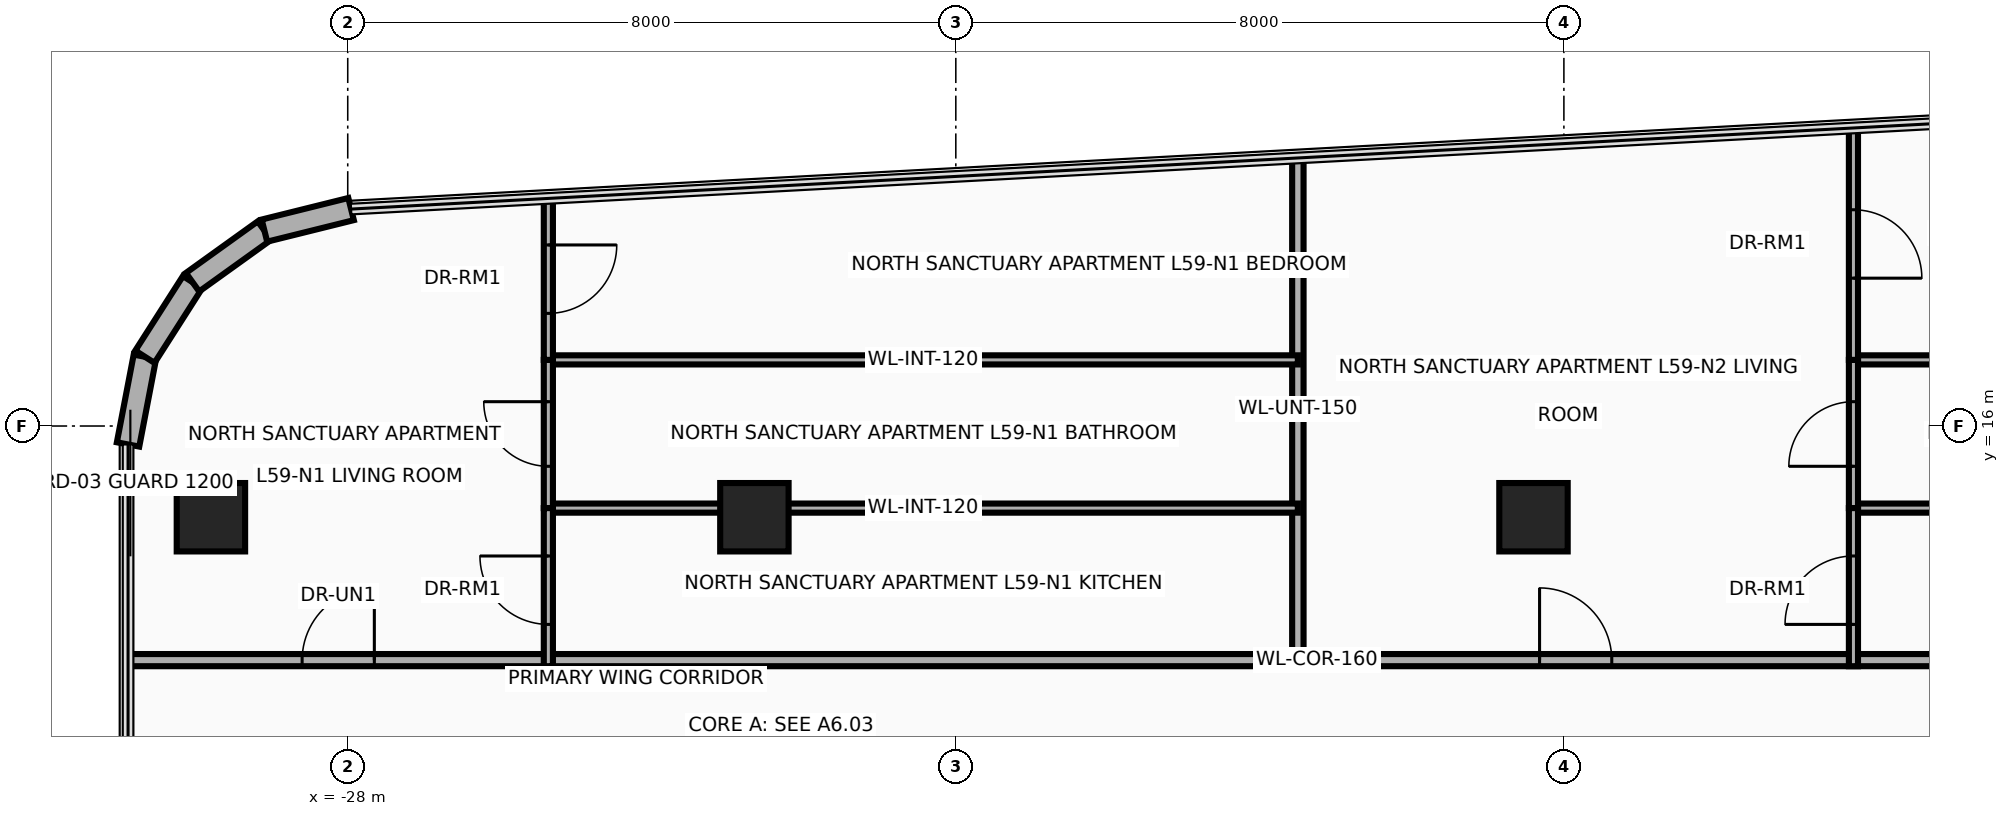
"""IFC4 building model, lengths in metres.
Left out: names, types, materials, properties, quantities, classifications, styles, units other than length and angle.
Written with IfcOpenShell. Run it as: python <this file> out.ifc"""

import sys

from ifc_helpers import new_model, si_unit, direction, frame, frame_2d, origin, origin_2d, place, context, subcontext, project, spatial, rectangle, extrude, source, transform, mapped, element, fill, save


model = new_model("IFC4")
c1 = context("Model", 3, precision=1e-05, world=origin(), true_north=direction((0.0, 1.0)))
c2 = subcontext(c1, "Body", "Model", "MODEL_VIEW")
j1 = project(units=[si_unit("LENGTHUNIT", "METRE"), si_unit("PLANEANGLEUNIT", "RADIAN")], contexts=[c1])
p1 = place(None, origin())
s1 = spatial("IfcSite", under=j1, at=p1, CompositionType="ELEMENT")
p2 = place(p1, origin())
s2 = spatial("IfcBuilding", under=s1, at=p2, CompositionType="ELEMENT")
p3 = place(p2, frame((0.0, 0.0, 230.0)))
s3 = spatial("IfcBuildingStorey", under=s2, at=p3, CompositionType="ELEMENT", Elevation=230.0)
m1 = source(origin(), c2, "Body", "SweptSolid", [
    extrude(rectangle(XDim=0.9, YDim=0.9, at=origin_2d()), origin(), (0.0, 0.0, 1.0), 3.5),
])
for number, where, z_axis, x_axis in (
    (1, (-29.8, 14.8, 0.0), (0.0, 0.0, 1.0), (1.0, 0.0, 0.0)),
    (2, (-22.65, 14.8, 0.0), (0.0, 0.0, 1.0), (1.0, 0.0, 0.0)),
    (3, (-12.4, 14.8, 0.0), (0.0, 0.0, 1.0), (1.0, 0.0, 0.0)),
):
    element("IfcColumn", number, at=place(p3, frame(where, z_axis=z_axis, x_axis=x_axis)), inside=s3, PredefinedType="COLUMN", context=c2, shape_type="MappedRepresentation", body=[
        mapped(m1, transform((0.0, 0.0, 0.0), x_axis=(1.0, 0.0, 0.0), y_axis=(0.0, 1.0, 0.0), z_axis=(0.0, 0.0, 1.0), scale=1.0)),
    ])
p4 = place(p3, frame((-30.89, 15.758, 0.0), z_axis=(0.0, 0.0, 1.0), x_axis=(0.18831542659, 0.982108598938, 0.0)))
e4 = element("IfcWall", 4, at=p4, inside=s3, PredefinedType="SOLIDWALL", context=c2, shape_type="SweptSolid", body=[
    extrude(rectangle(XDim=1.175, YDim=0.3, at=frame_2d((0.587, 0.0))), origin(), (0.0, 0.0, 1.0), 3.26),
])
p5 = place(p3, frame((-30.669, 16.911, 0.0), z_axis=(0.0, 0.0, 1.0), x_axis=(0.538678781902, 0.84251122837, 0.0)))
e5 = element("IfcWall", 5, at=p5, inside=s3, PredefinedType="SOLIDWALL", context=c2, shape_type="SweptSolid", body=[
    extrude(rectangle(XDim=1.164, YDim=0.3, at=frame_2d((0.582, 0.0))), origin(), (0.0, 0.0, 1.0), 3.26),
])
p6 = place(p3, frame((-30.042, 17.892, 0.0), z_axis=(0.0, 0.0, 1.0), x_axis=(0.812313539683, 0.583220981487, 0.0)))
e6 = element("IfcWall", 6, at=p6, inside=s3, PredefinedType="SOLIDWALL", context=c2, shape_type="SweptSolid", body=[
    extrude(rectangle(XDim=1.164, YDim=0.3, at=frame_2d((0.582, 0.0))), origin(), (0.0, 0.0, 1.0), 3.26),
])
p7 = place(p3, frame((-29.096, 18.571, 0.0), z_axis=(0.0, 0.0, 1.0), x_axis=(0.97050812798, 0.241068400098, 0.0)))
e7 = element("IfcWall", 7, at=p7, inside=s3, PredefinedType="SOLIDWALL", context=c2, shape_type="SweptSolid", body=[
    extrude(rectangle(XDim=1.175, YDim=0.3, at=frame_2d((0.587, 0.0))), origin(), (0.0, 0.0, 1.0), 3.26),
])
p8 = place(p3, frame((-30.89, 12.92, 0.0), z_axis=(0.0, 0.0, 1.0), x_axis=(1.0, 0.0, 0.0)))
e8 = element("IfcWall", 8, at=p8, inside=s3, PredefinedType="PARTITIONING", context=c2, shape_type="SweptSolid", body=[
    extrude(rectangle(XDim=31.28, YDim=0.16, at=frame_2d((15.64, 0.0))), origin(), (0.0, 0.0, 1.0), 2.634),
])
p9 = place(p8, frame((2.29, 0.0, 0.0)))
e9 = element("IfcOpeningElement", 9, at=p9, cuts=e8, PredefinedType="OPENING", context=c2, shape_type="SweptSolid", body=[
    extrude(rectangle(XDim=0.95, YDim=2.15, at=frame_2d((0.475, 1.075))), frame((0.0, 0.095, 0.0), z_axis=(0.0, -1.0, 0.0), x_axis=(1.0, 0.0, 0.0)), (0.0, 0.0, 1.0), 0.19),
])
p10 = place(p8, frame((18.57, 0.0, 0.0)))
e10 = element("IfcOpeningElement", 10, at=p10, cuts=e8, PredefinedType="OPENING", context=c2, shape_type="SweptSolid", body=[
    extrude(rectangle(XDim=0.95, YDim=2.15, at=frame_2d((0.475, 1.075))), frame((0.0, 0.095, 0.0), z_axis=(0.0, -1.0, 0.0), x_axis=(1.0, 0.0, 0.0)), (0.0, 0.0, 1.0), 0.19),
])
p11 = place(p3, frame((-15.5, 12.92, 0.0), z_axis=(0.0, 0.0, 1.0), x_axis=(0.0, 1.0, 0.0)))
e11 = element("IfcWall", 11, at=p11, inside=s3, PredefinedType="PARTITIONING", context=c2, shape_type="SweptSolid", body=[
    extrude(rectangle(XDim=6.606, YDim=0.15, at=frame_2d((3.303, 0.0))), origin(), (0.0, 0.0, 1.0), 2.544),
])
p12 = place(p3, frame((-25.361, 14.92, 0.0), z_axis=(0.0, 0.0, 1.0), x_axis=(1.0, 0.0, 0.0)))
e12 = element("IfcWall", 12, at=p12, inside=s3, PredefinedType="PARTITIONING", context=c2, shape_type="SweptSolid", body=[
    extrude(rectangle(XDim=9.861, YDim=0.12, at=frame_2d((4.93, 0.0))), origin(), (0.0, 0.0, 1.0), 2.544),
])
p13 = place(p3, frame((-25.361, 16.87, 0.0), z_axis=(0.0, 0.0, 1.0), x_axis=(1.0, 0.0, 0.0)))
e13 = element("IfcWall", 13, at=p13, inside=s3, PredefinedType="PARTITIONING", context=c2, shape_type="SweptSolid", body=[
    extrude(rectangle(XDim=9.861, YDim=0.12, at=frame_2d((4.93, 0.0))), origin(), (0.0, 0.0, 1.0), 3.26),
])
p14 = place(p3, frame((-25.361, 14.92, 0.0), z_axis=(0.0, 0.0, 1.0), x_axis=(0.0, 1.0, 0.0)))
e14 = element("IfcWall", 14, at=p14, inside=s3, PredefinedType="PARTITIONING", context=c2, shape_type="SweptSolid", body=[
    extrude(rectangle(XDim=1.95, YDim=0.12, at=frame_2d((0.975, 0.0))), origin(), (0.0, 0.0, 1.0), 2.544),
])
p15 = place(p14, frame((0.55, 0.0, 0.0)))
e15 = element("IfcOpeningElement", 15, at=p15, cuts=e14, PredefinedType="OPENING", context=c2, shape_type="SweptSolid", body=[
    extrude(rectangle(XDim=0.85, YDim=2.1, at=frame_2d((0.425, 1.05))), frame((0.0, 0.075, 0.0), z_axis=(0.0, -1.0, 0.0), x_axis=(1.0, 0.0, 0.0)), (0.0, 0.0, 1.0), 0.15),
])
p16 = place(p3, frame((-25.361, 12.84, 0.0), z_axis=(0.0, 0.0, 1.0), x_axis=(0.0, 1.0, 0.0)))
e16 = element("IfcWall", 16, at=p16, inside=s3, PredefinedType="PARTITIONING", context=c2, shape_type="SweptSolid", body=[
    extrude(rectangle(XDim=2.08, YDim=0.12, at=frame_2d((1.04, 0.0))), origin(), (0.0, 0.0, 1.0), 2.544),
])
p17 = place(p16, frame((0.55, 0.0, 0.0)))
e17 = element("IfcOpeningElement", 17, at=p17, cuts=e16, PredefinedType="OPENING", context=c2, shape_type="SweptSolid", body=[
    extrude(rectangle(XDim=0.9, YDim=2.1, at=frame_2d((0.45, 1.05))), frame((0.0, 0.075, 0.0), z_axis=(0.0, -1.0, 0.0), x_axis=(1.0, 0.0, 0.0)), (0.0, 0.0, 1.0), 0.15),
])
p18 = place(p3, frame((-25.361, 16.87, 0.0), z_axis=(0.0, 0.0, 1.0), x_axis=(0.0, 1.0, 0.0)))
e18 = element("IfcWall", 18, at=p18, inside=s3, PredefinedType="PARTITIONING", context=c2, shape_type="SweptSolid", body=[
    extrude(rectangle(XDim=2.124, YDim=0.12, at=frame_2d((1.062, 0.0))), origin(), (0.0, 0.0, 1.0), 3.26),
])
p19 = place(p18, frame((0.612, 0.0, 0.0)))
e19 = element("IfcOpeningElement", 19, at=p19, cuts=e18, PredefinedType="OPENING", context=c2, shape_type="SweptSolid", body=[
    extrude(rectangle(XDim=0.9, YDim=2.1, at=frame_2d((0.45, 1.05))), frame((0.0, 0.075, 0.0), z_axis=(0.0, -1.0, 0.0), x_axis=(1.0, 0.0, 0.0)), (0.0, 0.0, 1.0), 0.15),
])
p20 = place(p3, frame((-8.191, 14.92, 0.0), z_axis=(0.0, 0.0, 1.0), x_axis=(1.0, 0.0, 0.0)))
e20 = element("IfcWall", 20, at=p20, inside=s3, PredefinedType="PARTITIONING", context=c2, shape_type="SweptSolid", body=[
    extrude(rectangle(XDim=8.581, YDim=0.12, at=frame_2d((4.29, 0.0))), origin(), (0.0, 0.0, 1.0), 2.544),
])
p21 = place(p3, frame((-8.191, 16.87, 0.0), z_axis=(0.0, 0.0, 1.0), x_axis=(1.0, 0.0, 0.0)))
e21 = element("IfcWall", 21, at=p21, inside=s3, PredefinedType="PARTITIONING", context=c2, shape_type="SweptSolid", body=[
    extrude(rectangle(XDim=8.581, YDim=0.12, at=frame_2d((4.29, 0.0))), origin(), (0.0, 0.0, 1.0), 3.26),
])
p22 = place(p3, frame((-8.191, 14.92, 0.0), z_axis=(0.0, 0.0, 1.0), x_axis=(0.0, 1.0, 0.0)))
e22 = element("IfcWall", 22, at=p22, inside=s3, PredefinedType="PARTITIONING", context=c2, shape_type="SweptSolid", body=[
    extrude(rectangle(XDim=1.95, YDim=0.12, at=frame_2d((0.975, 0.0))), origin(), (0.0, 0.0, 1.0), 2.544),
])
p23 = place(p22, frame((0.55, 0.0, 0.0)))
e23 = element("IfcOpeningElement", 23, at=p23, cuts=e22, PredefinedType="OPENING", context=c2, shape_type="SweptSolid", body=[
    extrude(rectangle(XDim=0.85, YDim=2.1, at=frame_2d((0.425, 1.05))), frame((0.0, 0.075, 0.0), z_axis=(0.0, -1.0, 0.0), x_axis=(1.0, 0.0, 0.0)), (0.0, 0.0, 1.0), 0.15),
])
p24 = place(p3, frame((-8.191, 12.84, 0.0), z_axis=(0.0, 0.0, 1.0), x_axis=(0.0, 1.0, 0.0)))
e24 = element("IfcWall", 24, at=p24, inside=s3, PredefinedType="PARTITIONING", context=c2, shape_type="SweptSolid", body=[
    extrude(rectangle(XDim=2.08, YDim=0.12, at=frame_2d((1.04, 0.0))), origin(), (0.0, 0.0, 1.0), 2.544),
])
p25 = place(p24, frame((0.55, 0.0, 0.0)))
e25 = element("IfcOpeningElement", 25, at=p25, cuts=e24, PredefinedType="OPENING", context=c2, shape_type="SweptSolid", body=[
    extrude(rectangle(XDim=0.9, YDim=2.1, at=frame_2d((0.45, 1.05))), frame((0.0, 0.075, 0.0), z_axis=(0.0, -1.0, 0.0), x_axis=(1.0, 0.0, 0.0)), (0.0, 0.0, 1.0), 0.15),
])
p26 = place(p3, frame((-8.191, 16.87, 0.0), z_axis=(0.0, 0.0, 1.0), x_axis=(0.0, 1.0, 0.0)))
e26 = element("IfcWall", 26, at=p26, inside=s3, PredefinedType="PARTITIONING", context=c2, shape_type="SweptSolid", body=[
    extrude(rectangle(XDim=3.051, YDim=0.12, at=frame_2d((1.525, 0.0))), origin(), (0.0, 0.0, 1.0), 3.26),
])
p27 = place(p26, frame((1.075, 0.0, 0.0)))
e27 = element("IfcOpeningElement", 27, at=p27, cuts=e26, PredefinedType="OPENING", context=c2, shape_type="SweptSolid", body=[
    extrude(rectangle(XDim=0.9, YDim=2.1, at=frame_2d((0.45, 1.05))), frame((0.0, 0.075, 0.0), z_axis=(0.0, -1.0, 0.0), x_axis=(1.0, 0.0, 0.0)), (0.0, 0.0, 1.0), 0.15),
])
p28 = place(p9, origin())
e28 = element("IfcDoor", 28, at=p28, inside=s3, OperationType="SINGLE_SWING_RIGHT", PredefinedType="DOOR", context=c2, shape_type="SweptSolid", body=[
    extrude(rectangle(XDim=0.95, YDim=2.15, at=frame_2d((0.475, 1.075))), frame((0.0, 0.025, 0.0), z_axis=(0.0, -1.0, 0.0), x_axis=(1.0, 0.0, 0.0)), (0.0, 0.0, 1.0), 0.05),
])
fill(e9, e28)
p29 = place(p15, origin())
e29 = element("IfcDoor", 29, at=p29, inside=s3, OperationType="SINGLE_SWING_LEFT", PredefinedType="DOOR", context=c2, shape_type="SweptSolid", body=[
    extrude(rectangle(XDim=0.85, YDim=2.1, at=frame_2d((0.425, 1.05))), frame((0.0, 0.025, 0.0), z_axis=(0.0, -1.0, 0.0), x_axis=(1.0, 0.0, 0.0)), (0.0, 0.0, 1.0), 0.05),
])
fill(e15, e29)
p30 = place(p17, origin())
e30 = element("IfcDoor", 30, at=p30, inside=s3, OperationType="SINGLE_SWING_RIGHT", PredefinedType="DOOR", context=c2, shape_type="SweptSolid", body=[
    extrude(rectangle(XDim=0.9, YDim=2.1, at=frame_2d((0.45, 1.05))), frame((0.0, 0.025, 0.0), z_axis=(0.0, -1.0, 0.0), x_axis=(1.0, 0.0, 0.0)), (0.0, 0.0, 1.0), 0.05),
])
fill(e17, e30)
p31 = place(p19, frame((0.9, 0.0, 0.0), z_axis=(0.0, 0.0, 1.0), x_axis=(-1.0, 0.0, 0.0)))
e31 = element("IfcDoor", 31, at=p31, inside=s3, OperationType="SINGLE_SWING_LEFT", PredefinedType="DOOR", context=c2, shape_type="SweptSolid", body=[
    extrude(rectangle(XDim=0.9, YDim=2.1, at=frame_2d((0.45, 1.05))), frame((0.0, 0.025, 0.0), z_axis=(0.0, -1.0, 0.0), x_axis=(1.0, 0.0, 0.0)), (0.0, 0.0, 1.0), 0.05),
])
fill(e19, e31)
p32 = place(p10, origin())
e32 = element("IfcDoor", 32, at=p32, inside=s3, OperationType="SINGLE_SWING_RIGHT", PredefinedType="DOOR", context=c2, shape_type="SweptSolid", body=[
    extrude(rectangle(XDim=0.95, YDim=2.15, at=frame_2d((0.475, 1.075))), frame((0.0, 0.025, 0.0), z_axis=(0.0, -1.0, 0.0), x_axis=(1.0, 0.0, 0.0)), (0.0, 0.0, 1.0), 0.05),
])
fill(e10, e32)
p33 = place(p23, origin())
e33 = element("IfcDoor", 33, at=p33, inside=s3, OperationType="SINGLE_SWING_LEFT", PredefinedType="DOOR", context=c2, shape_type="SweptSolid", body=[
    extrude(rectangle(XDim=0.85, YDim=2.1, at=frame_2d((0.425, 1.05))), frame((0.0, 0.025, 0.0), z_axis=(0.0, -1.0, 0.0), x_axis=(1.0, 0.0, 0.0)), (0.0, 0.0, 1.0), 0.05),
])
fill(e23, e33)
p34 = place(p25, origin())
e34 = element("IfcDoor", 34, at=p34, inside=s3, OperationType="SINGLE_SWING_RIGHT", PredefinedType="DOOR", context=c2, shape_type="SweptSolid", body=[
    extrude(rectangle(XDim=0.9, YDim=2.1, at=frame_2d((0.45, 1.05))), frame((0.0, 0.025, 0.0), z_axis=(0.0, -1.0, 0.0), x_axis=(1.0, 0.0, 0.0)), (0.0, 0.0, 1.0), 0.05),
])
fill(e25, e34)
p35 = place(p27, frame((0.9, 0.0, 0.0), z_axis=(0.0, 0.0, 1.0), x_axis=(-1.0, 0.0, 0.0)))
e35 = element("IfcDoor", 35, at=p35, inside=s3, OperationType="SINGLE_SWING_LEFT", PredefinedType="DOOR", context=c2, shape_type="SweptSolid", body=[
    extrude(rectangle(XDim=0.9, YDim=2.1, at=frame_2d((0.45, 1.05))), frame((0.0, 0.025, 0.0), z_axis=(0.0, -1.0, 0.0), x_axis=(1.0, 0.0, 0.0)), (0.0, 0.0, 1.0), 0.05),
])
fill(e27, e35)
save(model, sys.argv[1])
